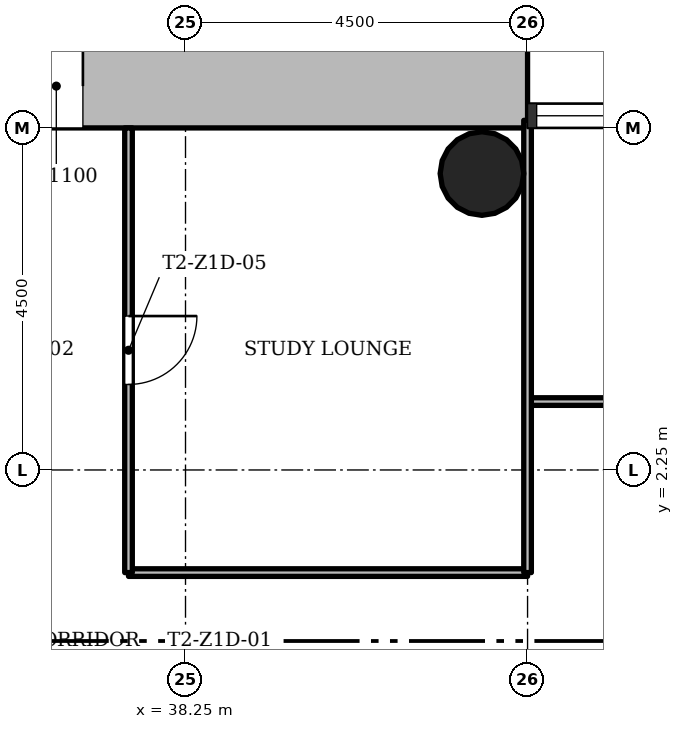
"""IFC4 building model, lengths in metres.
Left out: names, types, materials, properties, quantities, classifications, styles, units other than length and angle.
Written with IfcOpenShell. Run it as: python <this file> out.ifc"""

import sys

from ifc_helpers import new_model, si_unit, direction, frame, frame_2d, origin, origin_2d, place, context, subcontext, project, spatial, rectangle, hollow_circle, extrude, element, fill, save


model = new_model("IFC4")
c1 = context("Model", 3, precision=1e-05, world=origin(), true_north=direction((0.0, 1.0)))
c2 = subcontext(c1, "Body", "Model", "MODEL_VIEW")
j1 = project(units=[si_unit("LENGTHUNIT", "METRE"), si_unit("PLANEANGLEUNIT", "RADIAN")], contexts=[c1])
p1 = place(None, origin())
s1 = spatial("IfcSite", under=j1, at=p1, CompositionType="ELEMENT")
p2 = place(p1, origin())
s2 = spatial("IfcBuilding", under=s1, at=p2, CompositionType="ELEMENT")
p3 = place(p2, frame((0.0, 0.0, 58.5)))
s3 = spatial("IfcBuildingStorey", under=s2, at=p3, CompositionType="ELEMENT", Elevation=58.5)
p4 = place(p3, frame((30.35, 7.3, 0.0), z_axis=(0.0, 0.0, 1.0), x_axis=(1.0, 0.0, 0.0)))
e1 = element("IfcWall", 1, at=p4, inside=s3, PredefinedType="SHEAR", context=c2, shape_type="SweptSolid", body=[
    extrude(rectangle(XDim=12.4, YDim=1.1, at=frame_2d((6.2, 0.0))), origin(), (0.0, 0.0, 1.0), 3.4),
])
p5 = place(p4, frame((4.75, 0.0, 0.0)))
e2 = element("IfcOpeningElement", 2, at=p5, cuts=e1, PredefinedType="OPENING", context=c2, shape_type="SweptSolid", body=[
    extrude(rectangle(XDim=1.8, YDim=2.1, at=frame_2d((0.9, 1.05))), frame((0.0, 0.56, 0.0), z_axis=(0.0, -1.0, 0.0), x_axis=(1.0, 0.0, 0.0)), (0.0, 0.0, 1.0), 1.12),
])
p6 = place(p3, frame((42.15, 6.15, 0.0), z_axis=(0.0, 0.0, 1.0), x_axis=(1.0, 0.0, 0.0)))
e3 = element("IfcColumn", 3, at=p6, inside=s3, PredefinedType="COLUMN", context=c2, shape_type="SweptSolid", body=[
    extrude(hollow_circle(Radius=0.55, WallThickness=0.04, at=origin_2d()), origin(), (0.0, 0.0, 1.0), 3.4),
])
p7 = place(p3, frame((42.75, 0.9, 0.0), z_axis=(0.0, 0.0, 1.0), x_axis=(-1.0, 0.0, 0.0)))
e4 = element("IfcWall", 4, at=p7, inside=s3, PredefinedType="PARTITIONING", context=c2, shape_type="SweptSolid", body=[
    extrude(rectangle(XDim=5.25, YDim=0.1, at=frame_2d((2.625, 0.0))), origin(), (0.0, 0.0, 1.0), 3.0),
])
p8 = place(p3, frame((51.75, 3.15, 0.0), z_axis=(0.0, 0.0, 1.0), x_axis=(-1.0, 0.0, 0.0)))
e5 = element("IfcWall", 5, at=p8, inside=s3, PredefinedType="PARTITIONING", context=c2, shape_type="SweptSolid", body=[
    extrude(rectangle(XDim=9.0, YDim=0.1, at=frame_2d((4.5, 0.0))), origin(), (0.0, 0.0, 1.0), 3.0),
])
p9 = place(p8, frame((6.3, 0.0, 0.0)))
e6 = element("IfcOpeningElement", 6, at=p9, cuts=e5, PredefinedType="OPENING", context=c2, shape_type="SweptSolid", body=[
    extrude(rectangle(XDim=0.9, YDim=2.1, at=frame_2d((0.45, 1.05))), frame((0.0, 0.06, 0.0), z_axis=(0.0, -1.0, 0.0), x_axis=(1.0, 0.0, 0.0)), (0.0, 0.0, 1.0), 0.12),
])
p10 = place(p8, frame((1.8, 0.0, 0.0)))
e7 = element("IfcOpeningElement", 7, at=p10, cuts=e5, PredefinedType="OPENING", context=c2, shape_type="SweptSolid", body=[
    extrude(rectangle(XDim=0.9, YDim=2.1, at=frame_2d((0.45, 1.05))), frame((0.0, 0.06, 0.0), z_axis=(0.0, -1.0, 0.0), x_axis=(1.0, 0.0, 0.0)), (0.0, 0.0, 1.0), 0.12),
])
p11 = place(p3, frame((42.75, 0.9, 0.0), z_axis=(0.0, 0.0, 1.0), x_axis=(0.0, 1.0, 0.0)))
e8 = element("IfcWall", 8, at=p11, inside=s3, PredefinedType="PARTITIONING", context=c2, shape_type="SweptSolid", body=[
    extrude(rectangle(XDim=5.95, YDim=0.1, at=frame_2d((2.975, 0.0))), origin(), (0.0, 0.0, 1.0), 3.0),
])
p12 = place(p3, frame((37.5, 0.9, 0.0), z_axis=(0.0, 0.0, 1.0), x_axis=(0.0, 1.0, 0.0)))
e9 = element("IfcWall", 9, at=p12, inside=s3, PredefinedType="PARTITIONING", context=c2, shape_type="SweptSolid", body=[
    extrude(rectangle(XDim=5.85, YDim=0.1, at=frame_2d((2.925, 0.0))), origin(), (0.0, 0.0, 1.0), 3.0),
])
p13 = place(p12, frame((2.475, 0.0, 0.0)))
e10 = element("IfcOpeningElement", 10, at=p13, cuts=e9, PredefinedType="OPENING", context=c2, shape_type="SweptSolid", body=[
    extrude(rectangle(XDim=0.9, YDim=2.1, at=frame_2d((0.45, 1.05))), frame((0.0, 0.06, 0.0), z_axis=(0.0, -1.0, 0.0), x_axis=(1.0, 0.0, 0.0)), (0.0, 0.0, 1.0), 0.12),
])
p14 = place(p13, origin())
e11 = element("IfcDoor", 11, at=p14, inside=s3, OperationType="SINGLE_SWING_RIGHT", PredefinedType="DOOR", context=c2, shape_type="SweptSolid", body=[
    extrude(rectangle(XDim=0.9, YDim=2.1, at=frame_2d((0.45, 1.05))), frame((0.0, 0.025, 0.0), z_axis=(0.0, -1.0, 0.0), x_axis=(1.0, 0.0, 0.0)), (0.0, 0.0, 1.0), 0.05),
])
fill(e10, e11)
p15 = place(p5, origin())
e12 = element("IfcDoor", 12, at=p15, inside=s3, OperationType="SINGLE_SWING_LEFT", PredefinedType="DOOR", context=c2, shape_type="SweptSolid", body=[
    extrude(rectangle(XDim=1.8, YDim=2.1, at=frame_2d((0.9, 1.05))), frame((0.0, 0.025, 0.0), z_axis=(0.0, -1.0, 0.0), x_axis=(1.0, 0.0, 0.0)), (0.0, 0.0, 1.0), 0.05),
])
fill(e2, e12)
save(model, sys.argv[1])
